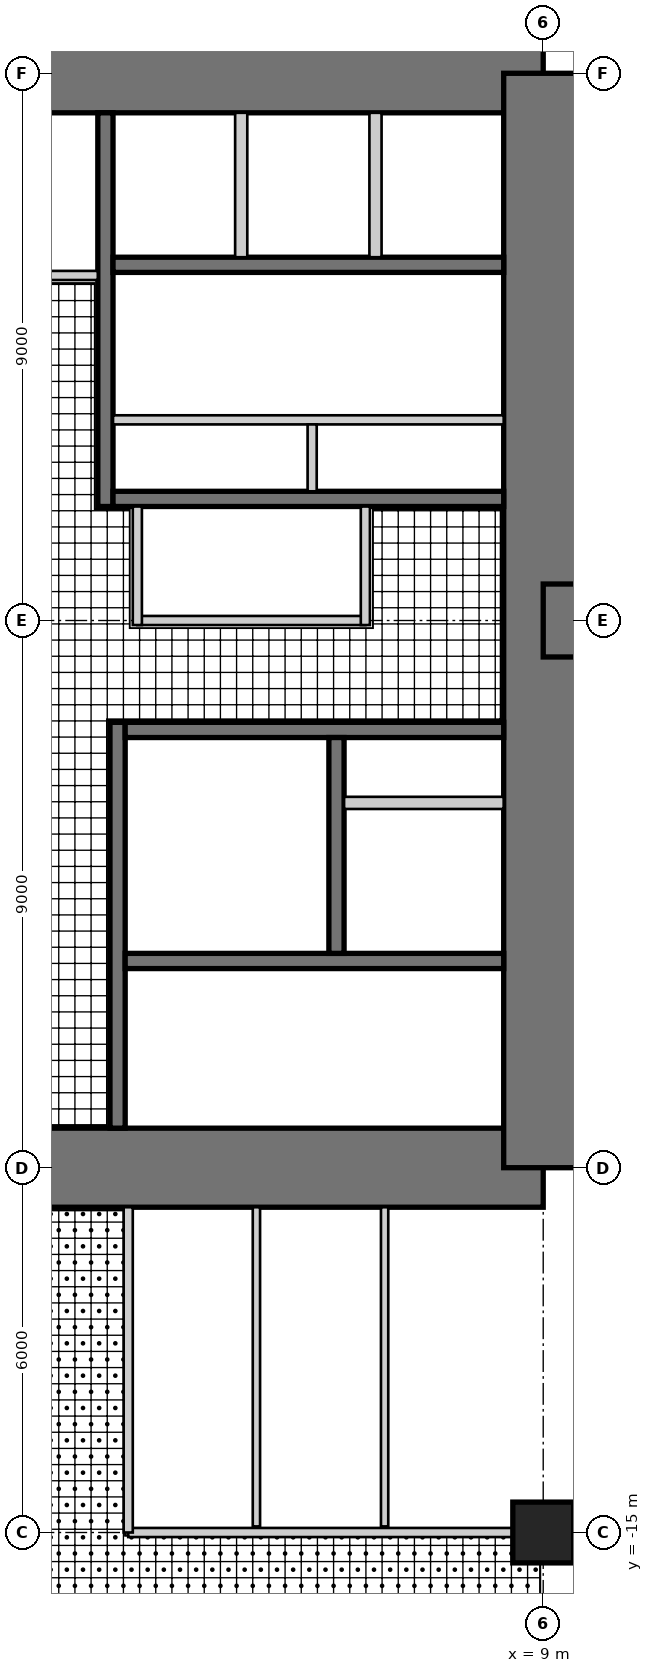
"""IFC4 building model, lengths in metres.
Left out: names, types, materials, properties, quantities, classifications, styles, units other than length and angle.
Written with IfcOpenShell. Run it as: python <this file> out.ifc"""

import sys

from ifc_helpers import new_model, si_unit, direction, frame, frame_2d, origin, origin_2d, place, context, subcontext, project, spatial, rectangle, extrude, element, fill, save


model = new_model("IFC4")
c1 = context("Model", 3, precision=1e-05, world=origin(), true_north=direction((0.0, 1.0)))
c2 = subcontext(c1, "Body", "Model", "MODEL_VIEW")
j1 = project(units=[si_unit("LENGTHUNIT", "METRE"), si_unit("PLANEANGLEUNIT", "RADIAN")], contexts=[c1])
p1 = place(None, origin())
s1 = spatial("IfcSite", under=j1, at=p1, CompositionType="ELEMENT")
p2 = place(p1, origin())
s2 = spatial("IfcBuilding", under=s1, at=p2, CompositionType="ELEMENT")
p3 = place(p2, frame((0.0, 0.0, 136.5)))
s3 = spatial("IfcBuildingStorey", under=s2, at=p3, CompositionType="ELEMENT", Elevation=136.5)
p4 = place(p3, frame((9.0, 9.0, 0.0), z_axis=(0.0, 0.0, 1.0), x_axis=(-1.0, 0.0, 0.0)))
e1 = element("IfcWall", 1, at=p4, inside=s3, PredefinedType="SHEAR", context=c2, shape_type="SweptSolid", body=[
    extrude(rectangle(XDim=18.0, YDim=1.3, at=frame_2d((9.0, 0.0))), origin(), (0.0, 0.0, 1.0), 4.0),
])
p5 = place(p4, frame((9.8, 0.0, 0.0)))
e2 = element("IfcOpeningElement", 2, at=p5, cuts=e1, PredefinedType="OPENING", context=c2, shape_type="SweptSolid", body=[
    extrude(rectangle(XDim=1.0, YDim=2.4, at=frame_2d((0.5, 1.2))), frame((0.0, 0.66, 0.0), z_axis=(0.0, -1.0, 0.0), x_axis=(1.0, 0.0, 0.0)), (0.0, 0.0, 1.0), 1.32),
])
p6 = place(p3, frame((-9.0, -9.0, 0.0), z_axis=(0.0, 0.0, 1.0), x_axis=(1.0, 0.0, 0.0)))
e3 = element("IfcWall", 3, at=p6, inside=s3, PredefinedType="SHEAR", context=c2, shape_type="SweptSolid", body=[
    extrude(rectangle(XDim=18.0, YDim=1.3, at=frame_2d((9.0, 0.0))), origin(), (0.0, 0.0, 1.0), 4.0),
])
p7 = place(p6, frame((9.8, 0.0, 0.0)))
e4 = element("IfcOpeningElement", 4, at=p7, cuts=e3, PredefinedType="OPENING", context=c2, shape_type="SweptSolid", body=[
    extrude(rectangle(XDim=1.0, YDim=2.4, at=frame_2d((0.5, 1.2))), frame((0.0, 0.66, 0.0), z_axis=(0.0, -1.0, 0.0), x_axis=(1.0, 0.0, 0.0)), (0.0, 0.0, 1.0), 1.32),
])
p8 = place(p3, frame((9.0, -9.0, 0.0), z_axis=(0.0, 0.0, 1.0), x_axis=(0.0, 1.0, 0.0)))
e5 = element("IfcWall", 5, at=p8, inside=s3, PredefinedType="SHEAR", context=c2, shape_type="SweptSolid", body=[
    extrude(rectangle(XDim=18.0, YDim=1.3, at=frame_2d((9.0, 0.0))), origin(), (0.0, 0.0, 1.0), 4.0),
])
p9 = place(p8, frame((9.8, 0.0, 0.0)))
e6 = element("IfcOpeningElement", 6, at=p9, cuts=e5, PredefinedType="OPENING", context=c2, shape_type="SweptSolid", body=[
    extrude(rectangle(XDim=1.0, YDim=2.4, at=frame_2d((0.5, 1.2))), frame((0.0, 0.66, 0.0), z_axis=(0.0, -1.0, 0.0), x_axis=(1.0, 0.0, 0.0)), (0.0, 0.0, 1.0), 1.32),
])
p10 = place(p3, frame((1.8, 1.875, 0.0), z_axis=(0.0, 0.0, 1.0), x_axis=(0.0, 1.0, 0.0)))
e7 = element("IfcWall", 7, at=p10, inside=s3, PredefinedType="SHEAR", context=c2, shape_type="SweptSolid", body=[
    extrude(rectangle(XDim=6.475, YDim=0.25, at=frame_2d((3.238, 0.0))), origin(), (0.0, 0.0, 1.0), 4.0),
])
p11 = place(p10, frame((1.875, 0.0, 0.0)))
e8 = element("IfcOpeningElement", 8, at=p11, cuts=e7, PredefinedType="OPENING", context=c2, shape_type="SweptSolid", body=[
    extrude(rectangle(XDim=1.6, YDim=2.4, at=frame_2d((0.8, 1.2))), frame((0.0, 0.135, 0.0), z_axis=(0.0, -1.0, 0.0), x_axis=(1.0, 0.0, 0.0)), (0.0, 0.0, 1.0), 0.27),
])
p12 = place(p3, frame((1.925, 2.0, 0.0), z_axis=(0.0, 0.0, 1.0), x_axis=(1.0, 0.0, 0.0)))
e9 = element("IfcWall", 9, at=p12, inside=s3, PredefinedType="SHEAR", context=c2, shape_type="SweptSolid", body=[
    extrude(rectangle(XDim=6.425, YDim=0.25, at=frame_2d((3.212, 0.0))), origin(), (0.0, 0.0, 1.0), 4.0),
])
p13 = place(p3, frame((1.925, 5.85, 0.0), z_axis=(0.0, 0.0, 1.0), x_axis=(1.0, 0.0, 0.0)))
e10 = element("IfcWall", 10, at=p13, inside=s3, PredefinedType="SHEAR", context=c2, shape_type="SweptSolid", body=[
    extrude(rectangle(XDim=6.425, YDim=0.25, at=frame_2d((3.212, 0.0))), origin(), (0.0, 0.0, 1.0), 4.0),
])
p14 = place(p13, frame((0.454, 0.0, 0.0)))
e11 = element("IfcOpeningElement", 11, at=p14, cuts=e10, PredefinedType="OPENING", context=c2, shape_type="SweptSolid", body=[
    extrude(rectangle(XDim=1.1, YDim=2.2, at=frame_2d((0.55, 1.1))), frame((0.0, 0.135, 0.0), z_axis=(0.0, -1.0, 0.0), x_axis=(1.0, 0.0, 0.0)), (0.0, 0.0, 1.0), 0.27),
])
p15 = place(p13, frame((2.663, 0.0, 0.0)))
e12 = element("IfcOpeningElement", 12, at=p15, cuts=e10, PredefinedType="OPENING", context=c2, shape_type="SweptSolid", body=[
    extrude(rectangle(XDim=1.1, YDim=2.2, at=frame_2d((0.55, 1.1))), frame((0.0, 0.135, 0.0), z_axis=(0.0, -1.0, 0.0), x_axis=(1.0, 0.0, 0.0)), (0.0, 0.0, 1.0), 0.27),
])
p16 = place(p13, frame((4.871, 0.0, 0.0)))
e13 = element("IfcOpeningElement", 13, at=p16, cuts=e10, PredefinedType="OPENING", context=c2, shape_type="SweptSolid", body=[
    extrude(rectangle(XDim=1.1, YDim=2.2, at=frame_2d((0.55, 1.1))), frame((0.0, 0.135, 0.0), z_axis=(0.0, -1.0, 0.0), x_axis=(1.0, 0.0, 0.0)), (0.0, 0.0, 1.0), 0.27),
])
p17 = place(p3, frame((1.925, 3.3, 0.0), z_axis=(0.0, 0.0, 1.0), x_axis=(1.0, 0.0, 0.0)))
e14 = element("IfcWall", 14, at=p17, inside=s3, PredefinedType="PARTITIONING", context=c2, shape_type="SweptSolid", body=[
    extrude(rectangle(XDim=6.425, YDim=0.15, at=frame_2d((3.212, 0.0))), origin(), (0.0, 0.0, 1.0), 4.0),
])
p18 = place(p17, frame((0.075, 0.0, 0.0)))
e15 = element("IfcOpeningElement", 15, at=p18, cuts=e14, PredefinedType="OPENING", context=c2, shape_type="SweptSolid", body=[
    extrude(rectangle(XDim=0.8, YDim=2.1, at=frame_2d((0.4, 1.05))), frame((0.0, 0.085, 0.0), z_axis=(0.0, -1.0, 0.0), x_axis=(1.0, 0.0, 0.0)), (0.0, 0.0, 1.0), 0.17),
])
p19 = place(p17, frame((3.675, 0.0, 0.0)))
e16 = element("IfcOpeningElement", 16, at=p19, cuts=e14, PredefinedType="OPENING", context=c2, shape_type="SweptSolid", body=[
    extrude(rectangle(XDim=0.8, YDim=2.1, at=frame_2d((0.4, 1.05))), frame((0.0, 0.085, 0.0), z_axis=(0.0, -1.0, 0.0), x_axis=(1.0, 0.0, 0.0)), (0.0, 0.0, 1.0), 0.17),
])
p20 = place(p3, frame((5.2, 2.125, 0.0), z_axis=(0.0, 0.0, 1.0), x_axis=(0.0, 1.0, 0.0)))
e17 = element("IfcWall", 17, at=p20, inside=s3, PredefinedType="PARTITIONING", context=c2, shape_type="SweptSolid", body=[
    extrude(rectangle(XDim=1.1, YDim=0.15, at=frame_2d((0.55, 0.0))), origin(), (0.0, 0.0, 1.0), 4.0),
])
for number, where, z_axis, x_axis in (
    (18, (4.033, 5.975, 0.0), (0.0, 0.0, 1.0), (0.0, 1.0, 0.0)),
    (19, (6.242, 5.975, 0.0), (0.0, 0.0, 1.0), (0.0, 1.0, 0.0)),
):
    element("IfcWall", number, at=place(p3, frame(where, z_axis=z_axis, x_axis=x_axis)), inside=s3, PredefinedType="PARTITIONING", context=c2, shape_type="SweptSolid", body=[
        extrude(rectangle(XDim=2.375, YDim=0.2, at=frame_2d((1.188, 0.0))), origin(), (0.0, 0.0, 1.0), 4.0),
    ])
p21 = place(p3, frame((2.0, -1.675, 0.0), z_axis=(0.0, 0.0, 1.0), x_axis=(0.0, -1.0, 0.0)))
e20 = element("IfcWall", 20, at=p21, inside=s3, PredefinedType="SHEAR", context=c2, shape_type="SweptSolid", body=[
    extrude(rectangle(XDim=6.675, YDim=0.25, at=frame_2d((3.337, 0.0))), origin(), (0.0, 0.0, 1.0), 4.0),
])
p22 = place(p21, frame((0.725, 0.0, 0.0)))
e21 = element("IfcOpeningElement", 21, at=p22, cuts=e20, PredefinedType="OPENING", context=c2, shape_type="SweptSolid", body=[
    extrude(rectangle(XDim=1.0, YDim=2.1, at=frame_2d((0.5, 1.05))), frame((0.0, 0.135, 0.0), z_axis=(0.0, -1.0, 0.0), x_axis=(1.0, 0.0, 0.0)), (0.0, 0.0, 1.0), 0.27),
])
p23 = place(p3, frame((2.125, -1.8, 0.0), z_axis=(0.0, 0.0, 1.0), x_axis=(1.0, 0.0, 0.0)))
e22 = element("IfcWall", 22, at=p23, inside=s3, PredefinedType="SHEAR", context=c2, shape_type="SweptSolid", body=[
    extrude(rectangle(XDim=6.225, YDim=0.25, at=frame_2d((3.113, 0.0))), origin(), (0.0, 0.0, 1.0), 4.0),
])
p24 = place(p3, frame((2.125, -5.6, 0.0), z_axis=(0.0, 0.0, 1.0), x_axis=(1.0, 0.0, 0.0)))
e23 = element("IfcWall", 23, at=p24, inside=s3, PredefinedType="SHEAR", context=c2, shape_type="SweptSolid", body=[
    extrude(rectangle(XDim=6.225, YDim=0.25, at=frame_2d((3.113, 0.0))), origin(), (0.0, 0.0, 1.0), 4.0),
])
p25 = place(p24, frame((0.175, 0.0, 0.0)))
e24 = element("IfcOpeningElement", 24, at=p25, cuts=e23, PredefinedType="OPENING", context=c2, shape_type="SweptSolid", body=[
    extrude(rectangle(XDim=1.0, YDim=2.1, at=frame_2d((0.5, 1.05))), frame((0.0, 0.135, 0.0), z_axis=(0.0, -1.0, 0.0), x_axis=(1.0, 0.0, 0.0)), (0.0, 0.0, 1.0), 0.27),
])
p26 = place(p3, frame((5.6, -1.925, 0.0), z_axis=(0.0, 0.0, 1.0), x_axis=(0.0, -1.0, 0.0)))
e25 = element("IfcWall", 25, at=p26, inside=s3, PredefinedType="SHEAR", context=c2, shape_type="SweptSolid", body=[
    extrude(rectangle(XDim=3.55, YDim=0.25, at=frame_2d((1.775, 0.0))), origin(), (0.0, 0.0, 1.0), 4.0),
])
p27 = place(p26, frame((1.525, 0.0, 0.0)))
e26 = element("IfcOpeningElement", 26, at=p27, cuts=e25, PredefinedType="OPENING", context=c2, shape_type="SweptSolid", body=[
    extrude(rectangle(XDim=1.1, YDim=2.2, at=frame_2d((0.55, 1.1))), frame((0.0, 0.135, 0.0), z_axis=(0.0, -1.0, 0.0), x_axis=(1.0, 0.0, 0.0)), (0.0, 0.0, 1.0), 0.27),
])
p28 = place(p26, frame((0.075, 0.0, 0.0)))
e27 = element("IfcOpeningElement", 27, at=p28, cuts=e25, PredefinedType="OPENING", context=c2, shape_type="SweptSolid", body=[
    extrude(rectangle(XDim=0.8, YDim=2.1, at=frame_2d((0.4, 1.05))), frame((0.0, 0.135, 0.0), z_axis=(0.0, -1.0, 0.0), x_axis=(1.0, 0.0, 0.0)), (0.0, 0.0, 1.0), 0.27),
])
p29 = place(p3, frame((5.725, -3.0, 0.0), z_axis=(0.0, 0.0, 1.0), x_axis=(1.0, 0.0, 0.0)))
e28 = element("IfcWall", 28, at=p29, inside=s3, PredefinedType="PARTITIONING", context=c2, shape_type="SweptSolid", body=[
    extrude(rectangle(XDim=2.625, YDim=0.2, at=frame_2d((1.312, 0.0))), origin(), (0.0, 0.0, 1.0), 4.0),
])
p30 = place(p3, frame((9.0, 0.0, 0.0), z_axis=(0.0, 0.0, 1.0), x_axis=(1.0, 0.0, 0.0)))
e29 = element("IfcWall", 29, at=p30, inside=s3, PredefinedType="SHEAR", context=c2, shape_type="SweptSolid", body=[
    extrude(rectangle(XDim=18.0, YDim=1.2, at=frame_2d((9.0, 0.0))), origin(), (0.0, 0.0, 1.0), 4.0),
])
p31 = place(p30, frame((9.8, 0.0, 0.0)))
e30 = element("IfcOpeningElement", 30, at=p31, cuts=e29, PredefinedType="OPENING", context=c2, shape_type="SweptSolid", body=[
    extrude(rectangle(XDim=1.0, YDim=2.2, at=frame_2d((0.5, 1.1))), frame((0.0, 0.61, 0.0), z_axis=(0.0, -1.0, 0.0), x_axis=(1.0, 0.0, 0.0)), (0.0, 0.0, 1.0), 1.22),
])
p32 = place(p3, frame((9.0, -15.0, 0.0), z_axis=(0.0, 0.0, 1.0), x_axis=(1.0, 0.0, 0.0)))
e31 = element("IfcColumn", 31, at=p32, inside=s3, PredefinedType="COLUMN", context=c2, shape_type="SweptSolid", body=[
    extrude(rectangle(XDim=1.0, YDim=1.0, at=origin_2d()), origin(), (0.0, 0.0, 1.0), 4.0),
])
p33 = place(p3, frame((2.325, 0.0, 0.0), z_axis=(0.0, 0.0, 1.0), x_axis=(1.0, 0.0, 0.0)))
e32 = element("IfcWall", 32, at=p33, inside=s3, PredefinedType="PARTITIONING", context=c2, shape_type="SweptSolid", body=[
    extrude(rectangle(XDim=3.75, YDim=0.15, at=frame_2d((1.875, 0.0))), origin(), (0.0, 0.0, 1.0), 3.8),
])
p34 = place(p33, frame((0.4, 0.0, 0.0)))
e33 = element("IfcOpeningElement", 33, at=p34, cuts=e32, PredefinedType="OPENING", context=c2, shape_type="SweptSolid", body=[
    extrude(rectangle(XDim=1.0, YDim=2.1, at=frame_2d((0.5, 1.05))), frame((0.0, 0.085, 0.0), z_axis=(0.0, -1.0, 0.0), x_axis=(1.0, 0.0, 0.0)), (0.0, 0.0, 1.0), 0.17),
])
for number, where, z_axis, x_axis in (
    (34, (2.325, 1.875, 0.0), (0.0, 0.0, 1.0), (0.0, -1.0, 0.0)),
    (35, (6.075, -0.075, 0.0), (0.0, 0.0, 1.0), (0.0, 1.0, 0.0)),
):
    element("IfcWall", number, at=place(p3, frame(where, z_axis=z_axis, x_axis=x_axis)), inside=s3, PredefinedType="PARTITIONING", context=c2, shape_type="SweptSolid", body=[
        extrude(rectangle(XDim=1.95, YDim=0.15, at=frame_2d((0.975, 0.0))), origin(), (0.0, 0.0, 1.0), 3.8),
    ])
p35 = place(p3, frame((1.675, 5.675, 0.0), z_axis=(0.0, 0.0, 1.0), x_axis=(-1.0, 0.0, 0.0)))
e36 = element("IfcWall", 36, at=p35, inside=s3, PredefinedType="PARTITIONING", context=c2, shape_type="SweptSolid", body=[
    extrude(rectangle(XDim=1.75, YDim=0.15, at=frame_2d((0.875, 0.0))), origin(), (0.0, 0.0, 1.0), 3.8),
])
p36 = place(p3, frame((2.175, -15.0, 0.0), z_axis=(0.0, 0.0, 1.0), x_axis=(1.0, 0.0, 0.0)))
e37 = element("IfcWall", 37, at=p36, inside=s3, PredefinedType="PARTITIONING", context=c2, shape_type="SweptSolid", body=[
    extrude(rectangle(XDim=6.325, YDim=0.15, at=frame_2d((3.163, 0.0))), origin(), (0.0, 0.0, 1.0), 3.0),
])
p37 = place(p36, frame((0.554, 0.0, 0.0)))
e38 = element("IfcOpeningElement", 38, at=p37, cuts=e37, PredefinedType="OPENING", context=c2, shape_type="SweptSolid", body=[
    extrude(rectangle(XDim=1.0, YDim=2.1, at=frame_2d((0.5, 1.05))), frame((0.0, 0.085, 0.0), z_axis=(0.0, -1.0, 0.0), x_axis=(1.0, 0.0, 0.0)), (0.0, 0.0, 1.0), 0.17),
])
p38 = place(p36, frame((2.663, 0.0, 0.0)))
e39 = element("IfcOpeningElement", 39, at=p38, cuts=e37, PredefinedType="OPENING", context=c2, shape_type="SweptSolid", body=[
    extrude(rectangle(XDim=1.0, YDim=2.1, at=frame_2d((0.5, 1.05))), frame((0.0, 0.085, 0.0), z_axis=(0.0, -1.0, 0.0), x_axis=(1.0, 0.0, 0.0)), (0.0, 0.0, 1.0), 0.17),
])
p39 = place(p36, frame((4.771, 0.0, 0.0)))
e40 = element("IfcOpeningElement", 40, at=p39, cuts=e37, PredefinedType="OPENING", context=c2, shape_type="SweptSolid", body=[
    extrude(rectangle(XDim=1.0, YDim=2.1, at=frame_2d((0.5, 1.05))), frame((0.0, 0.085, 0.0), z_axis=(0.0, -1.0, 0.0), x_axis=(1.0, 0.0, 0.0)), (0.0, 0.0, 1.0), 0.17),
])
p40 = place(p3, frame((2.175, -9.65, 0.0), z_axis=(0.0, 0.0, 1.0), x_axis=(0.0, -1.0, 0.0)))
e41 = element("IfcWall", 41, at=p40, inside=s3, PredefinedType="PARTITIONING", context=c2, shape_type="SweptSolid", body=[
    extrude(rectangle(XDim=5.35, YDim=0.15, at=frame_2d((2.675, 0.0))), origin(), (0.0, 0.0, 1.0), 3.8),
])
for number, where, z_axis, x_axis in (
    (42, (4.283, -9.65, 0.0), (0.0, 0.0, 1.0), (0.0, -1.0, 0.0)),
    (43, (6.392, -9.65, 0.0), (0.0, 0.0, 1.0), (0.0, -1.0, 0.0)),
):
    element("IfcWall", number, at=place(p3, frame(where, z_axis=z_axis, x_axis=x_axis)), inside=s3, PredefinedType="PLUMBINGWALL", context=c2, shape_type="SweptSolid", body=[
        extrude(rectangle(XDim=5.25, YDim=0.12, at=frame_2d((2.625, 0.0))), origin(), (0.0, 0.0, 1.0), 3.8),
    ])
p41 = place(p34, origin())
e44 = element("IfcDoor", 44, at=p41, inside=s3, OperationType="SINGLE_SWING_LEFT", PredefinedType="DOOR", context=c2, shape_type="SweptSolid", body=[
    extrude(rectangle(XDim=1.0, YDim=2.1, at=frame_2d((0.5, 1.05))), frame((0.0, 0.025, 0.0), z_axis=(0.0, -1.0, 0.0), x_axis=(1.0, 0.0, 0.0)), (0.0, 0.0, 1.0), 0.05),
])
fill(e33, e44)
p42 = place(p37, origin())
e45 = element("IfcDoor", 45, at=p42, inside=s3, OperationType="SINGLE_SWING_LEFT", PredefinedType="DOOR", context=c2, shape_type="SweptSolid", body=[
    extrude(rectangle(XDim=1.0, YDim=2.1, at=frame_2d((0.5, 1.05))), frame((0.0, 0.025, 0.0), z_axis=(0.0, -1.0, 0.0), x_axis=(1.0, 0.0, 0.0)), (0.0, 0.0, 1.0), 0.05),
])
fill(e38, e45)
p43 = place(p38, origin())
e46 = element("IfcDoor", 46, at=p43, inside=s3, OperationType="SINGLE_SWING_LEFT", PredefinedType="DOOR", context=c2, shape_type="SweptSolid", body=[
    extrude(rectangle(XDim=1.0, YDim=2.1, at=frame_2d((0.5, 1.05))), frame((0.0, 0.025, 0.0), z_axis=(0.0, -1.0, 0.0), x_axis=(1.0, 0.0, 0.0)), (0.0, 0.0, 1.0), 0.05),
])
fill(e39, e46)
p44 = place(p39, origin())
e47 = element("IfcDoor", 47, at=p44, inside=s3, OperationType="SINGLE_SWING_LEFT", PredefinedType="DOOR", context=c2, shape_type="SweptSolid", body=[
    extrude(rectangle(XDim=1.0, YDim=2.1, at=frame_2d((0.5, 1.05))), frame((0.0, 0.025, 0.0), z_axis=(0.0, -1.0, 0.0), x_axis=(1.0, 0.0, 0.0)), (0.0, 0.0, 1.0), 0.05),
])
fill(e40, e47)
p45 = place(p7, frame((1.0, 0.0, 0.0), z_axis=(0.0, 0.0, 1.0), x_axis=(-1.0, 0.0, 0.0)))
e48 = element("IfcDoor", 48, at=p45, inside=s3, OperationType="SINGLE_SWING_RIGHT", PredefinedType="DOOR", context=c2, shape_type="SweptSolid", body=[
    extrude(rectangle(XDim=1.0, YDim=2.4, at=frame_2d((0.5, 1.2))), frame((0.0, -0.005, 0.0), z_axis=(0.0, -1.0, 0.0), x_axis=(1.0, 0.0, 0.0)), (0.0, 0.0, 1.0), 0.05),
])
fill(e4, e48)
p46 = place(p9, frame((1.0, 0.0, 0.0), z_axis=(0.0, 0.0, 1.0), x_axis=(-1.0, 0.0, 0.0)))
e49 = element("IfcDoor", 49, at=p46, inside=s3, OperationType="SINGLE_SWING_RIGHT", PredefinedType="DOOR", context=c2, shape_type="SweptSolid", body=[
    extrude(rectangle(XDim=1.0, YDim=2.4, at=frame_2d((0.5, 1.2))), frame((0.0, -0.005, 0.0), z_axis=(0.0, -1.0, 0.0), x_axis=(1.0, 0.0, 0.0)), (0.0, 0.0, 1.0), 0.05),
])
fill(e6, e49)
p47 = place(p14, origin())
e50 = element("IfcDoor", 50, at=p47, inside=s3, OperationType="DOUBLE_DOOR_SLIDING", PredefinedType="DOOR", context=c2, shape_type="SweptSolid", body=[
    extrude(rectangle(XDim=1.1, YDim=2.2, at=frame_2d((0.55, 1.1))), frame((0.0, 0.025, 0.0), z_axis=(0.0, -1.0, 0.0), x_axis=(1.0, 0.0, 0.0)), (0.0, 0.0, 1.0), 0.05),
])
fill(e11, e50)
p48 = place(p15, origin())
e51 = element("IfcDoor", 51, at=p48, inside=s3, OperationType="DOUBLE_DOOR_SLIDING", PredefinedType="DOOR", context=c2, shape_type="SweptSolid", body=[
    extrude(rectangle(XDim=1.1, YDim=2.2, at=frame_2d((0.55, 1.1))), frame((0.0, 0.025, 0.0), z_axis=(0.0, -1.0, 0.0), x_axis=(1.0, 0.0, 0.0)), (0.0, 0.0, 1.0), 0.05),
])
fill(e12, e51)
p49 = place(p16, origin())
e52 = element("IfcDoor", 52, at=p49, inside=s3, OperationType="DOUBLE_DOOR_SLIDING", PredefinedType="DOOR", context=c2, shape_type="SweptSolid", body=[
    extrude(rectangle(XDim=1.1, YDim=2.2, at=frame_2d((0.55, 1.1))), frame((0.0, 0.025, 0.0), z_axis=(0.0, -1.0, 0.0), x_axis=(1.0, 0.0, 0.0)), (0.0, 0.0, 1.0), 0.05),
])
fill(e13, e52)
p50 = place(p11, origin())
e53 = element("IfcDoor", 53, at=p50, inside=s3, OperationType="DOUBLE_DOOR_DOUBLE_SWING", PredefinedType="DOOR", context=c2, shape_type="SweptSolid", body=[
    extrude(rectangle(XDim=1.6, YDim=2.4, at=frame_2d((0.8, 1.2))), frame((0.0, 0.025, 0.0), z_axis=(0.0, -1.0, 0.0), x_axis=(1.0, 0.0, 0.0)), (0.0, 0.0, 1.0), 0.05),
])
fill(e8, e53)
p51 = place(p18, frame((0.8, 0.0, 0.0), z_axis=(0.0, 0.0, 1.0), x_axis=(-1.0, 0.0, 0.0)))
e54 = element("IfcDoor", 54, at=p51, inside=s3, OperationType="SINGLE_SWING_RIGHT", PredefinedType="DOOR", context=c2, shape_type="SweptSolid", body=[
    extrude(rectangle(XDim=0.8, YDim=2.1, at=frame_2d((0.4, 1.05))), frame((0.0, 0.025, 0.0), z_axis=(0.0, -1.0, 0.0), x_axis=(1.0, 0.0, 0.0)), (0.0, 0.0, 1.0), 0.05),
])
fill(e15, e54)
p52 = place(p19, frame((0.8, 0.0, 0.0), z_axis=(0.0, 0.0, 1.0), x_axis=(-1.0, 0.0, 0.0)))
e55 = element("IfcDoor", 55, at=p52, inside=s3, OperationType="SINGLE_SWING_RIGHT", PredefinedType="DOOR", context=c2, shape_type="SweptSolid", body=[
    extrude(rectangle(XDim=0.8, YDim=2.1, at=frame_2d((0.4, 1.05))), frame((0.0, 0.025, 0.0), z_axis=(0.0, -1.0, 0.0), x_axis=(1.0, 0.0, 0.0)), (0.0, 0.0, 1.0), 0.05),
])
fill(e16, e55)
p53 = place(p22, origin())
e56 = element("IfcDoor", 56, at=p53, inside=s3, OperationType="SINGLE_SWING_LEFT", PredefinedType="DOOR", context=c2, shape_type="SweptSolid", body=[
    extrude(rectangle(XDim=1.0, YDim=2.1, at=frame_2d((0.5, 1.05))), frame((0.0, 0.025, 0.0), z_axis=(0.0, -1.0, 0.0), x_axis=(1.0, 0.0, 0.0)), (0.0, 0.0, 1.0), 0.05),
])
fill(e21, e56)
p54 = place(p25, frame((1.0, 0.0, 0.0), z_axis=(0.0, 0.0, 1.0), x_axis=(-1.0, 0.0, 0.0)))
e57 = element("IfcDoor", 57, at=p54, inside=s3, OperationType="SINGLE_SWING_RIGHT", PredefinedType="DOOR", context=c2, shape_type="SweptSolid", body=[
    extrude(rectangle(XDim=1.0, YDim=2.1, at=frame_2d((0.5, 1.05))), frame((0.0, 0.025, 0.0), z_axis=(0.0, -1.0, 0.0), x_axis=(1.0, 0.0, 0.0)), (0.0, 0.0, 1.0), 0.05),
])
fill(e24, e57)
p55 = place(p27, origin())
e58 = element("IfcDoor", 58, at=p55, inside=s3, OperationType="DOUBLE_DOOR_SLIDING", PredefinedType="DOOR", context=c2, shape_type="SweptSolid", body=[
    extrude(rectangle(XDim=1.1, YDim=2.2, at=frame_2d((0.55, 1.1))), frame((0.0, 0.025, 0.0), z_axis=(0.0, -1.0, 0.0), x_axis=(1.0, 0.0, 0.0)), (0.0, 0.0, 1.0), 0.05),
])
fill(e26, e58)
p56 = place(p28, origin())
e59 = element("IfcDoor", 59, at=p56, inside=s3, OperationType="SINGLE_SWING_LEFT", PredefinedType="DOOR", context=c2, shape_type="SweptSolid", body=[
    extrude(rectangle(XDim=0.8, YDim=2.1, at=frame_2d((0.4, 1.05))), frame((0.0, 0.025, 0.0), z_axis=(0.0, -1.0, 0.0), x_axis=(1.0, 0.0, 0.0)), (0.0, 0.0, 1.0), 0.05),
])
fill(e27, e59)
save(model, sys.argv[1])
